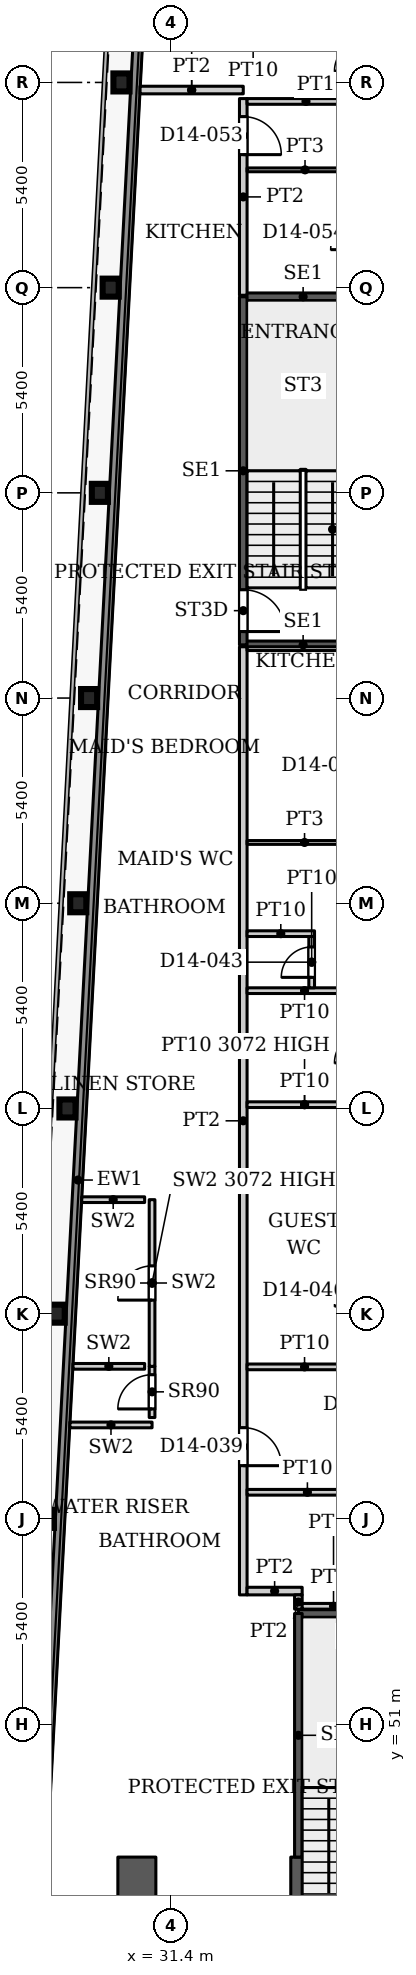
"""IFC4 building model, lengths in metres.
Left out: names, types, materials, properties, quantities, classifications, styles, units other than length and angle.
Written with IfcOpenShell. Run it as: python <this file> out.ifc"""

import sys

from ifc_helpers import new_model, si_unit, direction, frame, frame_2d, origin, origin_2d, place, context, subcontext, project, spatial, rectangle, i_section, extrude, source, transform, mapped, element, fill, save


model = new_model("IFC4")
c1 = context("Model", 3, precision=1e-05, world=origin(), true_north=direction((0.0, 1.0)))
c2 = subcontext(c1, "Body", "Model", "MODEL_VIEW")
j1 = project(units=[si_unit("LENGTHUNIT", "METRE"), si_unit("PLANEANGLEUNIT", "RADIAN")], contexts=[c1])
p1 = place(None, origin())
s1 = spatial("IfcSite", under=j1, at=p1, CompositionType="ELEMENT")
p2 = place(p1, origin())
s2 = spatial("IfcBuilding", under=s1, at=p2, CompositionType="ELEMENT")
p3 = place(p2, frame((0.0, 0.0, 61.7)))
s3 = spatial("IfcBuildingStorey", under=s2, at=p3, CompositionType="ELEMENT", Elevation=61.7)
for number, where, z_axis, x_axis in (
    (1, (28.106, 56.4, 0.0), (0.0, 0.0, 1.0), (1.0, 0.0, 0.0)),
    (2, (28.39, 61.8, 0.0), (0.0, 0.0, 1.0), (1.0, 0.0, 0.0)),
    (3, (28.674, 67.2, 0.0), (0.0, 0.0, 1.0), (1.0, 0.0, 0.0)),
    (4, (28.958, 72.6, 0.0), (0.0, 0.0, 1.0), (1.0, 0.0, 0.0)),
    (5, (29.243, 78.0, 0.0), (0.0, 0.0, 1.0), (1.0, 0.0, 0.0)),
    (6, (29.527, 83.4, 0.0), (0.0, 0.0, 1.0), (1.0, 0.0, 0.0)),
    (7, (29.811, 88.8, 0.0), (0.0, 0.0, 1.0), (1.0, 0.0, 0.0)),
    (8, (30.095, 94.2, 0.0), (0.0, 0.0, 1.0), (1.0, 0.0, 0.0)),
):
    element("IfcColumn", number, at=place(p3, frame(where, z_axis=z_axis, x_axis=x_axis)), inside=s3, PredefinedType="COLUMN", context=c2, shape_type="SweptSolid", body=[
        extrude(i_section(OverallWidth=0.424, OverallDepth=0.474, WebThickness=0.048, FlangeThickness=0.077, FilletRadius=0.014, at=origin_2d()), origin(), (0.0, 0.0, 1.0), 3.9),
    ])
p4 = place(p3, frame((34.75, 29.05, 0.0), z_axis=(0.0, 0.0, 1.0), x_axis=(0.0, 1.0, 0.0)))
e9 = element("IfcWall", 9, at=p4, inside=s3, PredefinedType="SHEAR", context=c2, shape_type="SweptSolid", body=[
    extrude(rectangle(XDim=18.45, YDim=0.4, at=frame_2d((9.225, 0.0))), origin(), (0.0, 0.0, 1.0), 3.9),
])
p5 = place(p4, frame((8.025, 0.0, 0.0)))
e10 = element("IfcOpeningElement", 10, at=p5, cuts=e9, PredefinedType="OPENING", context=c2, shape_type="SweptSolid", body=[
    extrude(rectangle(XDim=1.1, YDim=2.2, at=frame_2d((0.55, 1.1))), frame((0.0, 0.21, 0.0), z_axis=(0.0, -1.0, 0.0), x_axis=(1.0, 0.0, 0.0)), (0.0, 0.0, 1.0), 0.42),
])
p6 = place(p4, frame((10.875, 0.0, 0.0)))
e11 = element("IfcOpeningElement", 11, at=p6, cuts=e9, PredefinedType="OPENING", context=c2, shape_type="SweptSolid", body=[
    extrude(rectangle(XDim=1.1, YDim=2.2, at=frame_2d((0.55, 1.1))), frame((0.0, 0.21, 0.0), z_axis=(0.0, -1.0, 0.0), x_axis=(1.0, 0.0, 0.0)), (0.0, 0.0, 1.0), 0.42),
])
p7 = place(p4, frame((13.725, 0.0, 0.0)))
e12 = element("IfcOpeningElement", 12, at=p7, cuts=e9, PredefinedType="OPENING", context=c2, shape_type="SweptSolid", body=[
    extrude(rectangle(XDim=1.1, YDim=2.2, at=frame_2d((0.55, 1.1))), frame((0.0, 0.21, 0.0), z_axis=(0.0, -1.0, 0.0), x_axis=(1.0, 0.0, 0.0)), (0.0, 0.0, 1.0), 0.42),
])
p8 = place(p4, frame((15.95, 0.0, 0.0)))
e13 = element("IfcOpeningElement", 13, at=p8, cuts=e9, PredefinedType="OPENING", context=c2, shape_type="SweptSolid", body=[
    extrude(rectangle(XDim=1.1, YDim=2.2, at=frame_2d((0.55, 1.1))), frame((0.0, 0.21, 0.0), z_axis=(0.0, -1.0, 0.0), x_axis=(1.0, 0.0, 0.0)), (0.0, 0.0, 1.0), 0.42),
])
p9 = place(p3, frame((30.5, 29.05, 0.0), z_axis=(0.0, 0.0, 1.0), x_axis=(0.0, 1.0, 0.0)))
e14 = element("IfcWall", 14, at=p9, inside=s3, PredefinedType="SHEAR", context=c2, shape_type="SweptSolid", body=[
    extrude(rectangle(XDim=18.45, YDim=1.0, at=frame_2d((9.225, 0.0))), origin(), (0.0, 0.0, 1.0), 3.9),
])
p10 = place(p9, frame((1.5, 0.0, 0.0)))
e15 = element("IfcOpeningElement", 15, at=p10, cuts=e14, PredefinedType="OPENING", context=c2, shape_type="SweptSolid", body=[
    extrude(rectangle(XDim=0.9, YDim=2.2, at=frame_2d((0.45, 1.1))), frame((0.0, 0.51, 0.0), z_axis=(0.0, -1.0, 0.0), x_axis=(1.0, 0.0, 0.0)), (0.0, 0.0, 1.0), 1.02),
])
p11 = place(p9, frame((6.03, 0.0, 0.0)))
e16 = element("IfcOpeningElement", 16, at=p11, cuts=e14, PredefinedType="OPENING", context=c2, shape_type="SweptSolid", body=[
    extrude(rectangle(XDim=0.9, YDim=2.2, at=frame_2d((0.45, 1.1))), frame((0.0, 0.51, 0.0), z_axis=(0.0, -1.0, 0.0), x_axis=(1.0, 0.0, 0.0)), (0.0, 0.0, 1.0), 1.02),
])
p12 = place(p9, frame((9.7, 0.0, 0.0)))
e17 = element("IfcOpeningElement", 17, at=p12, cuts=e14, PredefinedType="OPENING", context=c2, shape_type="SweptSolid", body=[
    extrude(rectangle(XDim=0.9, YDim=2.2, at=frame_2d((0.45, 1.1))), frame((0.0, 0.51, 0.0), z_axis=(0.0, -1.0, 0.0), x_axis=(1.0, 0.0, 0.0)), (0.0, 0.0, 1.0), 1.02),
])
p13 = place(p3, frame((27.195, 31.969, 0.0), z_axis=(0.0, 0.0, 1.0), x_axis=(0.052554995867, 0.998618031286, 0.0)))
e18 = element("IfcWall", 18, at=p13, inside=s3, PredefinedType="SOLIDWALL", context=c2, shape_type="SweptSolid", body=[
    extrude(rectangle(XDim=66.787, YDim=0.25, at=frame_2d((33.394, 0.0))), origin(), (0.0, 0.0, 1.0), 3.75),
])
p14 = place(p3, frame((34.75, 53.91, 0.0), z_axis=(0.0, 0.0, 1.0), x_axis=(1.0, 0.0, 0.0)))
e19 = element("IfcWall", 19, at=p14, inside=s3, PredefinedType="SHEAR", context=c2, shape_type="SweptSolid", body=[
    extrude(rectangle(XDim=3.15, YDim=0.2, at=frame_2d((1.575, 0.0))), origin(), (0.0, 0.0, 1.0), 3.9),
])
p15 = place(p3, frame((34.75, 47.5, 0.0), z_axis=(0.0, 0.0, 1.0), x_axis=(0.0, 1.0, 0.0)))
e20 = element("IfcWall", 20, at=p15, inside=s3, PredefinedType="SHEAR", context=c2, shape_type="SweptSolid", body=[
    extrude(rectangle(XDim=6.41, YDim=0.2, at=frame_2d((3.205, 0.0))), origin(), (0.0, 0.0, 1.0), 3.9),
])
for number, where, z_axis, x_axis in (
    (21, (33.3, 79.4, 0.0), (0.0, 0.0, 1.0), (1.0, 0.0, 0.0)),
    (22, (33.3, 88.56, 0.0), (0.0, 0.0, 1.0), (1.0, 0.0, 0.0)),
):
    element("IfcWall", number, at=place(p3, frame(where, z_axis=z_axis, x_axis=x_axis)), inside=s3, PredefinedType="SHEAR", context=c2, shape_type="SweptSolid", body=[
        extrude(rectangle(XDim=3.15, YDim=0.2, at=frame_2d((1.575, 0.0))), origin(), (0.0, 0.0, 1.0), 3.9),
    ])
p16 = place(p3, frame((33.3, 79.4, 0.0), z_axis=(0.0, 0.0, 1.0), x_axis=(0.0, 1.0, 0.0)))
e23 = element("IfcWall", 23, at=p16, inside=s3, PredefinedType="SHEAR", context=c2, shape_type="SweptSolid", body=[
    extrude(rectangle(XDim=9.16, YDim=0.2, at=frame_2d((4.58, 0.0))), origin(), (0.0, 0.0, 1.0), 3.9),
])
p17 = place(p16, frame((0.35, 0.0, 0.0)))
e24 = element("IfcOpeningElement", 24, at=p17, cuts=e23, PredefinedType="OPENING", context=c2, shape_type="SweptSolid", body=[
    extrude(rectangle(XDim=1.1, YDim=2.2, at=frame_2d((0.55, 1.1))), frame((0.0, 0.11, 0.0), z_axis=(0.0, -1.0, 0.0), x_axis=(1.0, 0.0, 0.0)), (0.0, 0.0, 1.0), 0.22),
])
p18 = place(p3, frame((28.738, 58.872, 0.0), z_axis=(0.0, 0.0, 1.0), x_axis=(1.0, 0.0, 0.0)))
e25 = element("IfcWall", 25, at=p18, inside=s3, PredefinedType="PARTITIONING", context=c2, shape_type="SweptSolid", body=[
    extrude(rectangle(XDim=2.162, YDim=0.15, at=frame_2d((1.081, 0.0))), origin(), (0.0, 0.0, 1.0), 3.9),
])
p19 = place(p3, frame((30.9, 59.067, 0.0), z_axis=(0.0, 0.0, 1.0), x_axis=(0.0, 1.0, 0.0)))
e26 = element("IfcWall", 26, at=p19, inside=s3, PredefinedType="PARTITIONING", context=c2, shape_type="SweptSolid", body=[
    extrude(rectangle(XDim=1.347, YDim=0.15, at=frame_2d((0.674, 0.0))), origin(), (0.0, 0.0, 1.0), 3.9),
])
p20 = place(p19, frame((0.226, 0.0, 0.0)))
e27 = element("IfcOpeningElement", 27, at=p20, cuts=e26, PredefinedType="OPENING", context=c2, shape_type="SweptSolid", body=[
    extrude(rectangle(XDim=0.9, YDim=2.2, at=frame_2d((0.45, 1.1))), frame((0.0, 0.085, 0.0), z_axis=(0.0, -1.0, 0.0), x_axis=(1.0, 0.0, 0.0)), (0.0, 0.0, 1.0), 0.17),
])
p21 = place(p3, frame((28.82, 60.414, 0.0), z_axis=(0.0, 0.0, 1.0), x_axis=(1.0, 0.0, 0.0)))
e28 = element("IfcWall", 28, at=p21, inside=s3, PredefinedType="PARTITIONING", context=c2, shape_type="SweptSolid", body=[
    extrude(rectangle(XDim=1.885, YDim=0.15, at=frame_2d((0.942, 0.0))), origin(), (0.0, 0.0, 1.0), 3.9),
])
p22 = place(p3, frame((30.9, 60.414, 0.0), z_axis=(0.0, 0.0, 1.0), x_axis=(0.0, 1.0, 0.0)))
e29 = element("IfcWall", 29, at=p22, inside=s3, PredefinedType="PARTITIONING", context=c2, shape_type="SweptSolid", body=[
    extrude(rectangle(XDim=4.386, YDim=0.15, at=frame_2d((2.193, 0.0))), origin(), (0.0, 0.0, 1.0), 3.072),
])
p23 = place(p22, frame((1.743, 0.0, 0.0)))
e30 = element("IfcOpeningElement", 30, at=p23, cuts=e29, PredefinedType="OPENING", context=c2, shape_type="SweptSolid", body=[
    extrude(rectangle(XDim=0.9, YDim=2.2, at=frame_2d((0.45, 1.1))), frame((0.0, 0.085, 0.0), z_axis=(0.0, -1.0, 0.0), x_axis=(1.0, 0.0, 0.0)), (0.0, 0.0, 1.0), 0.17),
])
p24 = place(p3, frame((29.05, 64.8, 0.0), z_axis=(0.0, 0.0, 1.0), x_axis=(1.0, 0.0, 0.0)))
e31 = element("IfcWall", 31, at=p24, inside=s3, PredefinedType="PARTITIONING", context=c2, shape_type="SweptSolid", body=[
    extrude(rectangle(XDim=1.655, YDim=0.15, at=frame_2d((0.828, 0.0))), origin(), (0.0, 0.0, 1.0), 3.9),
])
p25 = place(p3, frame((30.585, 94.0, 0.0), z_axis=(0.0, 0.0, 1.0), x_axis=(1.0, 0.0, 0.0)))
e32 = element("IfcWall", 32, at=p25, inside=s3, PredefinedType="PARTITIONING", context=c2, shape_type="SweptSolid", body=[
    extrude(rectangle(XDim=2.715, YDim=0.2, at=frame_2d((1.358, 0.0))), origin(), (0.0, 0.0, 1.0), 3.147),
])
p26 = place(p3, frame((33.3, 54.4, 0.0), z_axis=(0.0, 0.0, 1.0), x_axis=(0.0, 1.0, 0.0)))
e33 = element("IfcWall", 33, at=p26, inside=s3, PredefinedType="PARTITIONING", context=c2, shape_type="SweptSolid", body=[
    extrude(rectangle(XDim=24.95, YDim=0.2, at=frame_2d((12.475, 0.0))), origin(), (0.0, 0.0, 1.0), 3.6),
])
p27 = place(p26, frame((3.4, 0.0, 0.0)))
e34 = element("IfcOpeningElement", 34, at=p27, cuts=e33, PredefinedType="OPENING", context=c2, shape_type="SweptSolid", body=[
    extrude(rectangle(XDim=1.0, YDim=2.1, at=frame_2d((0.5, 1.05))), frame((0.0, 0.11, 0.0), z_axis=(0.0, -1.0, 0.0), x_axis=(1.0, 0.0, 0.0)), (0.0, 0.0, 1.0), 0.22),
])
p28 = place(p3, frame((33.3, 88.6, 0.0), z_axis=(0.0, 0.0, 1.0), x_axis=(0.0, 1.0, 0.0)))
e35 = element("IfcWall", 35, at=p28, inside=s3, PredefinedType="PARTITIONING", context=c2, shape_type="SweptSolid", body=[
    extrude(rectangle(XDim=5.175, YDim=0.2, at=frame_2d((2.587, 0.0))), origin(), (0.0, 0.0, 1.0), 3.6),
])
p29 = place(p28, frame((3.7, 0.0, 0.0)))
e36 = element("IfcOpeningElement", 36, at=p29, cuts=e35, PredefinedType="OPENING", context=c2, shape_type="SweptSolid", body=[
    extrude(rectangle(XDim=1.0, YDim=2.1, at=frame_2d((0.5, 1.05))), frame((0.0, 0.11, 0.0), z_axis=(0.0, -1.0, 0.0), x_axis=(1.0, 0.0, 0.0)), (0.0, 0.0, 1.0), 0.22),
])
p30 = place(p3, frame((33.4, 54.5, 0.0), z_axis=(0.0, 0.0, 1.0), x_axis=(1.0, 0.0, 0.0)))
e37 = element("IfcWall", 37, at=p30, inside=s3, PredefinedType="PARTITIONING", context=c2, shape_type="SweptSolid", body=[
    extrude(rectangle(XDim=1.45, YDim=0.2, at=frame_2d((0.725, 0.0))), origin(), (0.0, 0.0, 1.0), 3.6),
])
p31 = place(p3, frame((33.4, 57.1, 0.0), z_axis=(0.0, 0.0, 1.0), x_axis=(1.0, 0.0, 0.0)))
e38 = element("IfcWall", 38, at=p31, inside=s3, PredefinedType="PARTITIONING", context=c2, shape_type="SweptSolid", body=[
    extrude(rectangle(XDim=3.175, YDim=0.15, at=frame_2d((1.587, 0.0))), origin(), (0.0, 0.0, 1.0), 3.6),
])
p32 = place(p3, frame((33.4, 60.4, 0.0), z_axis=(0.0, 0.0, 1.0), x_axis=(1.0, 0.0, 0.0)))
e39 = element("IfcWall", 39, at=p32, inside=s3, PredefinedType="PARTITIONING", context=c2, shape_type="SweptSolid", body=[
    extrude(rectangle(XDim=3.025, YDim=0.15, at=frame_2d((1.513, 0.0))), origin(), (0.0, 0.0, 1.0), 3.6),
])
p33 = place(p3, frame((33.4, 67.3, 0.0), z_axis=(0.0, 0.0, 1.0), x_axis=(1.0, 0.0, 0.0)))
e40 = element("IfcWall", 40, at=p33, inside=s3, PredefinedType="PARTITIONING", context=c2, shape_type="SweptSolid", body=[
    extrude(rectangle(XDim=3.025, YDim=0.15, at=frame_2d((1.513, 0.0))), origin(), (0.0, 0.0, 1.0), 3.072),
])
p34 = place(p3, frame((33.4, 70.3, 0.0), z_axis=(0.0, 0.0, 1.0), x_axis=(1.0, 0.0, 0.0)))
e41 = element("IfcWall", 41, at=p34, inside=s3, PredefinedType="PARTITIONING", context=c2, shape_type="SweptSolid", body=[
    extrude(rectangle(XDim=3.025, YDim=0.15, at=frame_2d((1.513, 0.0))), origin(), (0.0, 0.0, 1.0), 3.6),
])
p35 = place(p3, frame((33.4, 71.8, 0.0), z_axis=(0.0, 0.0, 1.0), x_axis=(1.0, 0.0, 0.0)))
e42 = element("IfcWall", 42, at=p35, inside=s3, PredefinedType="PARTITIONING", context=c2, shape_type="SweptSolid", body=[
    extrude(rectangle(XDim=1.775, YDim=0.15, at=frame_2d((0.888, 0.0))), origin(), (0.0, 0.0, 1.0), 3.6),
])
p36 = place(p3, frame((33.4, 74.2, 0.0), z_axis=(0.0, 0.0, 1.0), x_axis=(1.0, 0.0, 0.0)))
e43 = element("IfcWall", 43, at=p36, inside=s3, PredefinedType="PARTITIONING", context=c2, shape_type="SweptSolid", body=[
    extrude(rectangle(XDim=3.025, YDim=0.1, at=frame_2d((1.513, 0.0))), origin(), (0.0, 0.0, 1.0), 3.6),
])
p37 = place(p3, frame((33.4, 79.3, 0.0), z_axis=(0.0, 0.0, 1.0), x_axis=(1.0, 0.0, 0.0)))
e44 = element("IfcWall", 44, at=p37, inside=s3, PredefinedType="PARTITIONING", context=c2, shape_type="SweptSolid", body=[
    extrude(rectangle(XDim=12.5, YDim=0.1, at=frame_2d((6.25, 0.0))), origin(), (0.0, 0.0, 1.0), 3.6),
])
p38 = place(p37, frame((3.355, 0.0, 0.0)))
e45 = element("IfcOpeningElement", 45, at=p38, cuts=e44, PredefinedType="OPENING", context=c2, shape_type="SweptSolid", body=[
    extrude(rectangle(XDim=0.9, YDim=2.1, at=frame_2d((0.45, 1.05))), frame((0.0, 0.06, 0.0), z_axis=(0.0, -1.0, 0.0), x_axis=(1.0, 0.0, 0.0)), (0.0, 0.0, 1.0), 0.12),
])
p39 = place(p3, frame((33.4, 91.9, 0.0), z_axis=(0.0, 0.0, 1.0), x_axis=(1.0, 0.0, 0.0)))
e46 = element("IfcWall", 46, at=p39, inside=s3, PredefinedType="PARTITIONING", context=c2, shape_type="SweptSolid", body=[
    extrude(rectangle(XDim=3.05, YDim=0.1, at=frame_2d((1.525, 0.0))), origin(), (0.0, 0.0, 1.0), 3.6),
])
p40 = place(p3, frame((33.4, 93.7, 0.0), z_axis=(0.0, 0.0, 1.0), x_axis=(1.0, 0.0, 0.0)))
e47 = element("IfcWall", 47, at=p40, inside=s3, PredefinedType="PARTITIONING", context=c2, shape_type="SweptSolid", body=[
    extrude(rectangle(XDim=3.1, YDim=0.15, at=frame_2d((1.55, 0.0))), origin(), (0.0, 0.0, 1.0), 3.6),
])
p41 = place(p3, frame((34.75, 54.025, 0.0), z_axis=(0.0, 0.0, 1.0), x_axis=(0.0, 1.0, 0.0)))
e48 = element("IfcWall", 48, at=p41, inside=s3, PredefinedType="PARTITIONING", context=c2, shape_type="SweptSolid", body=[
    extrude(rectangle(XDim=0.375, YDim=0.2, at=frame_2d((0.188, 0.0))), origin(), (0.0, 0.0, 1.0), 3.6),
])
p42 = place(p3, frame((34.85, 54.1, 0.0), z_axis=(0.0, 0.0, 1.0), x_axis=(1.0, 0.0, 0.0)))
e49 = element("IfcWall", 49, at=p42, inside=s3, PredefinedType="PARTITIONING", context=c2, shape_type="SweptSolid", body=[
    extrude(rectangle(XDim=1.65, YDim=0.15, at=frame_2d((0.825, 0.0))), origin(), (0.0, 0.0, 1.0), 3.6),
])
p43 = place(p3, frame((35.1, 70.375, 0.0), z_axis=(0.0, 0.0, 1.0), x_axis=(0.0, 1.0, 0.0)))
e50 = element("IfcWall", 50, at=p43, inside=s3, PredefinedType="PARTITIONING", context=c2, shape_type="SweptSolid", body=[
    extrude(rectangle(XDim=1.35, YDim=0.15, at=frame_2d((0.675, 0.0))), origin(), (0.0, 0.0, 1.0), 3.6),
])
p44 = place(p43, frame((0.275, 0.0, 0.0)))
e51 = element("IfcOpeningElement", 51, at=p44, cuts=e50, PredefinedType="OPENING", context=c2, shape_type="SweptSolid", body=[
    extrude(rectangle(XDim=0.8, YDim=2.1, at=frame_2d((0.4, 1.05))), frame((0.0, 0.085, 0.0), z_axis=(0.0, -1.0, 0.0), x_axis=(1.0, 0.0, 0.0)), (0.0, 0.0, 1.0), 0.17),
])
m1 = source(origin(), c2, "Body", "SweptSolid", [
    extrude(rectangle(XDim=0.9, YDim=2.2, at=frame_2d((0.45, 1.1))), frame((0.0, 0.025, 0.0), z_axis=(0.0, -1.0, 0.0), x_axis=(1.0, 0.0, 0.0)), (0.0, 0.0, 1.0), 0.05),
])
p45 = place(p20, origin())
e52 = element("IfcDoor", 52, at=p45, inside=s3, OperationType="SINGLE_SWING_LEFT", PredefinedType="DOOR", context=c2, shape_type="MappedRepresentation", body=[
    mapped(m1, transform((0.0, 0.0, 0.0), x_axis=(1.0, 0.0, 0.0), y_axis=(0.0, 1.0, 0.0), z_axis=(0.0, 0.0, 1.0), scale=1.0)),
])
fill(e27, e52)
p46 = place(p23, origin())
e53 = element("IfcDoor", 53, at=p46, inside=s3, OperationType="SINGLE_SWING_LEFT", PredefinedType="DOOR", context=c2, shape_type="MappedRepresentation", body=[
    mapped(m1, transform((0.0, 0.0, 0.0), x_axis=(1.0, 0.0, 0.0), y_axis=(0.0, 1.0, 0.0), z_axis=(0.0, 0.0, 1.0), scale=1.0)),
])
fill(e30, e53)
m2 = source(origin(), c2, "Body", "SweptSolid", [
    extrude(rectangle(XDim=1.1, YDim=2.2, at=frame_2d((0.55, 1.1))), frame((0.0, 0.025, 0.0), z_axis=(0.0, -1.0, 0.0), x_axis=(1.0, 0.0, 0.0)), (0.0, 0.0, 1.0), 0.05),
])
p47 = place(p17, origin())
e54 = element("IfcDoor", 54, at=p47, inside=s3, OperationType="SINGLE_SWING_RIGHT", PredefinedType="DOOR", context=c2, shape_type="MappedRepresentation", body=[
    mapped(m2, transform((0.0, 0.0, 0.0), x_axis=(1.0, 0.0, 0.0), y_axis=(0.0, 1.0, 0.0), z_axis=(0.0, 0.0, 1.0), scale=1.0)),
])
fill(e24, e54)
m3 = source(origin(), c2, "Body", "SweptSolid", [
    extrude(rectangle(XDim=1.0, YDim=2.1, at=frame_2d((0.5, 1.05))), frame((0.0, 0.025, 0.0), z_axis=(0.0, -1.0, 0.0), x_axis=(1.0, 0.0, 0.0)), (0.0, 0.0, 1.0), 0.05),
])
p48 = place(p27, origin())
e55 = element("IfcDoor", 55, at=p48, inside=s3, OperationType="SINGLE_SWING_RIGHT", PredefinedType="DOOR", context=c2, shape_type="MappedRepresentation", body=[
    mapped(m3, transform((0.0, 0.0, 0.0), x_axis=(1.0, 0.0, 0.0), y_axis=(0.0, 1.0, 0.0), z_axis=(0.0, 0.0, 1.0), scale=1.0)),
])
fill(e34, e55)
m4 = source(origin(), c2, "Body", "SweptSolid", [
    extrude(rectangle(XDim=0.8, YDim=2.1, at=frame_2d((0.4, 1.05))), frame((0.0, 0.025, 0.0), z_axis=(0.0, -1.0, 0.0), x_axis=(1.0, 0.0, 0.0)), (0.0, 0.0, 1.0), 0.05),
])
p49 = place(p44, origin())
e56 = element("IfcDoor", 56, at=p49, inside=s3, OperationType="SINGLE_SWING_LEFT", PredefinedType="DOOR", context=c2, shape_type="MappedRepresentation", body=[
    mapped(m4, transform((0.0, 0.0, 0.0), x_axis=(1.0, 0.0, 0.0), y_axis=(0.0, 1.0, 0.0), z_axis=(0.0, 0.0, 1.0), scale=1.0)),
])
fill(e51, e56)
p50 = place(p29, origin())
e57 = element("IfcDoor", 57, at=p50, inside=s3, OperationType="SINGLE_SWING_RIGHT", PredefinedType="DOOR", context=c2, shape_type="MappedRepresentation", body=[
    mapped(m3, transform((0.0, 0.0, 0.0), x_axis=(1.0, 0.0, 0.0), y_axis=(0.0, 1.0, 0.0), z_axis=(0.0, 0.0, 1.0), scale=1.0)),
])
fill(e36, e57)
save(model, sys.argv[1])
